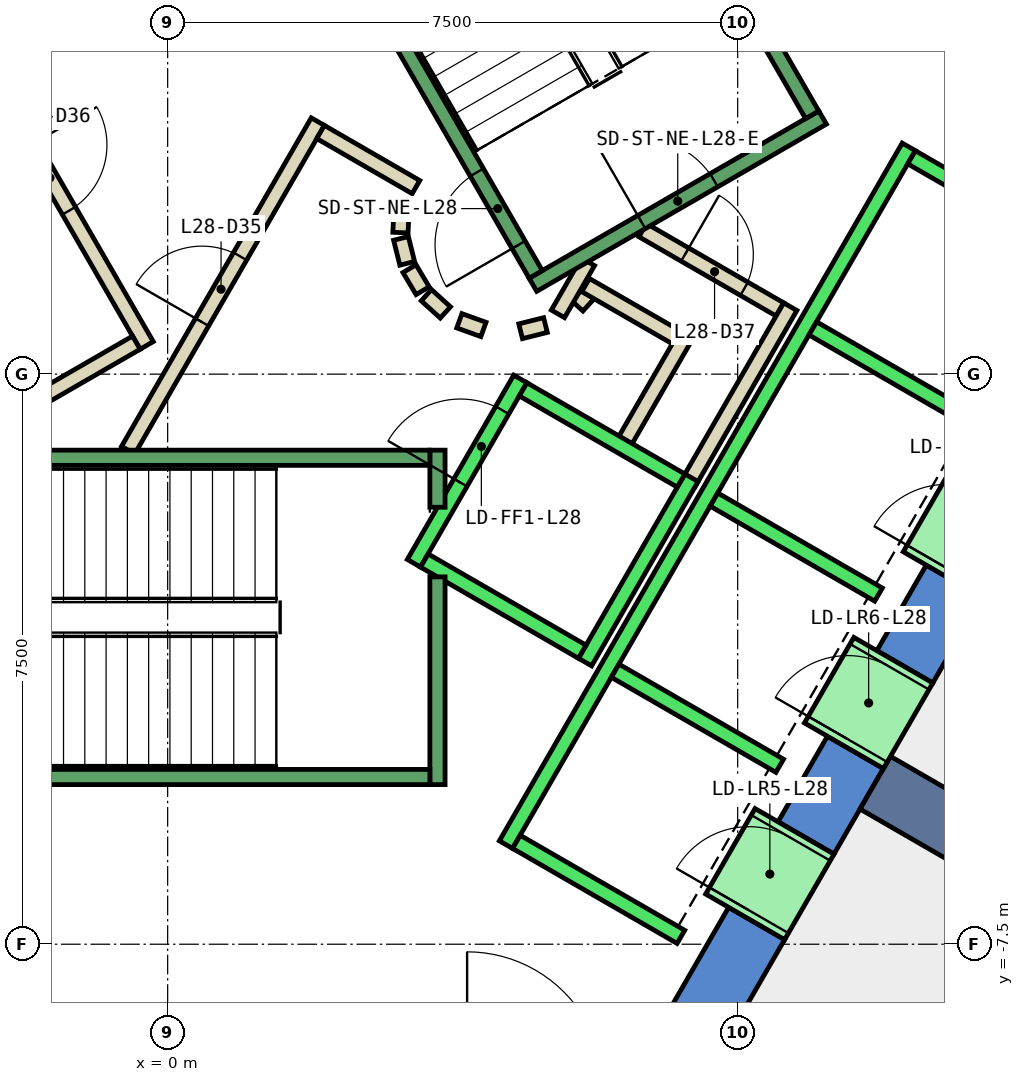
"""IFC4 building model, lengths in metres.
Left out: names, types, materials, properties, quantities, classifications, styles, units other than length and angle.
Written with IfcOpenShell. Run it as: python <this file> out.ifc"""

import sys

from ifc_helpers import new_model, si_unit, direction, frame, frame_2d, origin, place, context, subcontext, project, spatial, polyline, rectangle, outline, extrude, element, fill, save


model = new_model("IFC4")
c1 = context("Model", 3, precision=1e-05, world=origin(), true_north=direction((0.0, 1.0)))
c2 = subcontext(c1, "Body", "Model", "MODEL_VIEW")
j1 = project(units=[si_unit("LENGTHUNIT", "METRE"), si_unit("PLANEANGLEUNIT", "RADIAN")], contexts=[c1])
p1 = place(None, origin())
s1 = spatial("IfcSite", under=j1, at=p1, CompositionType="ELEMENT")
p2 = place(p1, origin())
s2 = spatial("IfcBuilding", under=s1, at=p2, CompositionType="ELEMENT")
p3 = place(p2, frame((0.0, 0.0, 128.6)))
s3 = spatial("IfcBuildingStorey", under=s2, at=p3, CompositionType="ELEMENT", Elevation=128.6)
p4 = place(p3, frame((0.0, 0.0, -0.4)))
e1 = element("IfcWall", 1, at=p4, inside=s3, PredefinedType="SHEAR", context=c2, shape_type="SweptSolid", body=[
    extrude(outline(polyline([(8.517, 11.748), (7.781, 11.323), (12.875, 2.5), (13.856, 2.5), (8.517, 11.748)])), origin(), (0.0, 0.0, 1.0), 4.0),
])
p5 = place(p3, frame((0.0, 0.0, -0.4)))
e2 = element("IfcWall", 2, at=p5, inside=s3, PredefinedType="SHEAR", context=c2, shape_type="SweptSolid", body=[
    extrude(outline(polyline([(8.117, -7.44), (7.381, -7.015), (6.437, -8.65), (6.928, -9.5), (8.117, -7.44)])), origin(), (0.0, 0.0, 1.0), 4.0),
])
p6 = place(p3, frame((0.0, 0.0, -0.4)))
e3 = element("IfcWall", 3, at=p6, inside=s3, PredefinedType="SHEAR", context=c2, shape_type="SweptSolid", body=[
    extrude(outline(polyline([(9.417, -5.189), (8.681, -4.764), (8.031, -5.889), (8.767, -6.314), (9.417, -5.189)])), origin(), (0.0, 0.0, 1.0), 4.0),
])
p7 = place(p3, frame((0.0, 0.0, -0.4)))
e4 = element("IfcWall", 4, at=p7, inside=s3, PredefinedType="SHEAR", context=c2, shape_type="SweptSolid", body=[
    extrude(outline(polyline([(10.717, -2.937), (9.981, -2.512), (9.331, -3.638), (10.067, -4.063), (10.717, -2.937)])), origin(), (0.0, 0.0, 1.0), 4.0),
])
p8 = place(p3, frame((9.31, -5.375, -0.4), z_axis=(0.0, 0.0, 1.0), x_axis=(0.866017533419, -0.500013631625, 0.0)))
e5 = element("IfcWall", 5, at=p8, inside=s3, PredefinedType="SHEAR", context=c2, shape_type="SweptSolid", body=[
    extrude(rectangle(XDim=9.0, YDim=0.8, at=frame_2d((4.5, 0.0))), origin(), (0.0, 0.0, 1.0), 4.0),
])
p9 = place(p3, frame((5.39, 0.898, 0.0), z_axis=(0.0, 0.0, 1.0), x_axis=(0.673828488714, 0.738887791073, 0.0)))
e6 = element("IfcWall", 6, at=p9, inside=s3, PredefinedType="PARTITIONING", context=c2, shape_type="SweptSolid", body=[
    extrude(rectangle(XDim=0.263, YDim=0.2, at=frame_2d((0.131, 0.0))), origin(), (0.0, 0.0, 1.0), 3.6),
])
p10 = place(p3, frame((5.499, 1.172, 0.0), z_axis=(0.0, 0.0, 1.0), x_axis=(0.866333505267, -0.499465972466, 0.0)))
e7 = element("IfcWall", 7, at=p10, inside=s3, PredefinedType="PARTITIONING", context=c2, shape_type="SweptSolid", body=[
    extrude(rectangle(XDim=1.374, YDim=0.2, at=frame_2d((0.687, 0.0))), origin(), (0.0, 0.0, 1.0), 3.6),
])
p11 = place(p3, frame((6.826, 0.522, 0.0), z_axis=(0.0, 0.0, 1.0), x_axis=(-0.500016722714, -0.866015748706, 0.0)))
e8 = element("IfcWall", 8, at=p11, inside=s3, PredefinedType="PARTITIONING", context=c2, shape_type="SweptSolid", body=[
    extrude(rectangle(XDim=1.7, YDim=0.2, at=frame_2d((0.85, 0.0))), origin(), (0.0, 0.0, 1.0), 3.6),
])
p12 = place(p3, frame((6.25, 1.894, 0.0), z_axis=(0.0, 0.0, 1.0), x_axis=(0.866043184279, -0.499969202016, 0.0)))
e9 = element("IfcWall", 9, at=p12, inside=s3, PredefinedType="PARTITIONING", context=c2, shape_type="SweptSolid", body=[
    extrude(rectangle(XDim=2.084, YDim=0.2, at=frame_2d((1.042, 0.0))), origin(), (0.0, 0.0, 1.0), 3.6),
])
p13 = place(p12, frame((0.642, 0.0, 0.0)))
e10 = element("IfcOpeningElement", 10, at=p13, cuts=e9, PredefinedType="OPENING", context=c2, shape_type="SweptSolid", body=[
    extrude(rectangle(XDim=0.9, YDim=2.1, at=frame_2d((0.45, 1.05))), frame((0.0, 0.11, 0.0), z_axis=(0.0, -1.0, 0.0), x_axis=(1.0, 0.0, 0.0)), (0.0, 0.0, 1.0), 0.22),
])
p14 = place(p3, frame((8.192, 0.888, 0.0), z_axis=(0.0, 0.0, 1.0), x_axis=(-0.499940625693, -0.866059680843, 0.0)))
e11 = element("IfcWall", 11, at=p14, inside=s3, PredefinedType="PARTITIONING", context=c2, shape_type="SweptSolid", body=[
    extrude(rectangle(XDim=2.68, YDim=0.2, at=frame_2d((1.34, 0.0))), origin(), (0.0, 0.0, 1.0), 3.6),
])
p15 = place(p3, frame((5.135, 0.793, 0.0), z_axis=(0.0, 0.0, 1.0), x_axis=(0.499526442893, 0.866298639529, 0.0)))
e12 = element("IfcWall", 12, at=p15, inside=s3, PredefinedType="PARTITIONING", context=c2, shape_type="SweptSolid", body=[
    extrude(rectangle(XDim=0.791, YDim=0.2, at=frame_2d((0.396, 0.0))), origin(), (0.0, 0.0, 1.0), 3.6),
])
p16 = place(p3, frame((-0.52, -1.0, 0.0), z_axis=(0.0, 0.0, 1.0), x_axis=(0.50011622646, 0.865958290007, 0.0)))
e13 = element("IfcWall", 13, at=p16, inside=s3, PredefinedType="PARTITIONING", context=c2, shape_type="SweptSolid", body=[
    extrude(rectangle(XDim=4.991, YDim=0.2, at=frame_2d((2.496, 0.0))), origin(), (0.0, 0.0, 1.0), 3.6),
])
p17 = place(p16, frame((1.945, 0.0, 0.0)))
e14 = element("IfcOpeningElement", 14, at=p17, cuts=e13, PredefinedType="OPENING", context=c2, shape_type="SweptSolid", body=[
    extrude(rectangle(XDim=1.0, YDim=2.1, at=frame_2d((0.5, 1.05))), frame((0.0, 0.11, 0.0), z_axis=(0.0, -1.0, 0.0), x_axis=(1.0, 0.0, 0.0)), (0.0, 0.0, 1.0), 0.22),
])
p18 = place(p3, frame((2.012, 3.186, 0.0), z_axis=(0.0, 0.0, 1.0), x_axis=(0.865891012941, -0.500232699559, 0.0)))
e15 = element("IfcWall", 15, at=p18, inside=s3, PredefinedType="PARTITIONING", context=c2, shape_type="SweptSolid", body=[
    extrude(rectangle(XDim=1.449, YDim=0.2, at=frame_2d((0.725, 0.0))), origin(), (0.0, 0.0, 1.0), 3.6),
])
p19 = place(p3, frame((3.079, 2.199, 0.0), z_axis=(0.0, 0.0, 1.0), x_axis=(-0.047771483479, -0.998858290933, 0.0)))
e16 = element("IfcWall", 16, at=p19, inside=s3, PredefinedType="PARTITIONING", context=c2, shape_type="SweptSolid", body=[
    extrude(rectangle(XDim=0.337, YDim=0.2, at=frame_2d((0.169, 0.0))), origin(), (0.0, 0.0, 1.0), 3.6),
])
p20 = place(p3, frame((3.07, 1.786, 0.0), z_axis=(0.0, 0.0, 1.0), x_axis=(0.242705583207, -0.970099994784, 0.0)))
e17 = element("IfcWall", 17, at=p20, inside=s3, PredefinedType="PARTITIONING", context=c2, shape_type="SweptSolid", body=[
    extrude(rectangle(XDim=0.338, YDim=0.2, at=frame_2d((0.169, 0.0))), origin(), (0.0, 0.0, 1.0), 3.6),
])
for number, where, z_axis, x_axis in (
    (18, (3.182, 1.388, 0.0), (0.0, 0.0, 1.0), (0.512, -0.859, 0.0)),
    (19, (3.404, 1.039, 0.0), (0.0, 0.0, 1.0), (0.74, -0.672, 0.0)),
):
    element("IfcWall", number, at=place(p3, frame(where, z_axis=z_axis, x_axis=x_axis)), inside=s3, PredefinedType="PARTITIONING", context=c2, shape_type="SweptSolid", body=[
        extrude(rectangle(XDim=0.338, YDim=0.2, at=frame_2d((0.169, 0.0))), origin(), (0.0, 0.0, 1.0), 3.6),
    ])
p21 = place(p3, frame((3.838, 0.702, 0.0), z_axis=(0.0, 0.0, 1.0), x_axis=(0.941035081519, -0.338308993895, 0.0)))
e20 = element("IfcWall", 20, at=p21, inside=s3, PredefinedType="PARTITIONING", context=c2, shape_type="SweptSolid", body=[
    extrude(rectangle(XDim=0.337, YDim=0.2, at=frame_2d((0.168, 0.0))), origin(), (0.0, 0.0, 1.0), 3.6),
])
p22 = place(p3, frame((4.644, 0.564, 0.0), z_axis=(0.0, 0.0, 1.0), x_axis=(0.969929076366, 0.243387729394, 0.0)))
e21 = element("IfcWall", 21, at=p22, inside=s3, PredefinedType="PARTITIONING", context=c2, shape_type="SweptSolid", body=[
    extrude(rectangle(XDim=0.337, YDim=0.2, at=frame_2d((0.168, 0.0))), origin(), (0.0, 0.0, 1.0), 3.6),
])
p23 = place(p3, frame((-2.771, 4.7, 0.0), z_axis=(0.0, 0.0, 1.0), x_axis=(0.499969479948, -0.866043023828, 0.0)))
e22 = element("IfcWall", 22, at=p23, inside=s3, PredefinedType="PARTITIONING", context=c2, shape_type="SweptSolid", body=[
    extrude(rectangle(XDim=4.99, YDim=0.2, at=frame_2d((2.495, 0.0))), origin(), (0.0, 0.0, 1.0), 3.6),
])
p24 = place(p23, frame((1.945, 0.0, 0.0)))
e23 = element("IfcOpeningElement", 23, at=p24, cuts=e22, PredefinedType="OPENING", context=c2, shape_type="SweptSolid", body=[
    extrude(rectangle(XDim=1.0, YDim=2.1, at=frame_2d((0.5, 1.05))), frame((0.0, 0.11, 0.0), z_axis=(0.0, -1.0, 0.0), x_axis=(1.0, 0.0, 0.0)), (0.0, 0.0, 1.0), 0.22),
])
p25 = place(p3, frame((-0.412, 0.414, 0.0), z_axis=(0.0, 0.0, 1.0), x_axis=(-0.866017369001, -0.500013916395, 0.0)))
e24 = element("IfcWall", 24, at=p25, inside=s3, PredefinedType="PARTITIONING", context=c2, shape_type="SweptSolid", body=[
    extrude(rectangle(XDim=1.45, YDim=0.2, at=frame_2d((0.725, 0.0))), origin(), (0.0, 0.0, 1.0), 3.6),
])
p26 = place(p3, frame((12.401, -7.621, 0.0), z_axis=(0.0, 0.0, 1.0), x_axis=(-0.499983724212, -0.866034800411, 0.0)))
e25 = element("IfcWall", 25, at=p26, inside=s3, PredefinedType="PARTITIONING", context=c2, shape_type="SweptSolid", body=[
    extrude(rectangle(XDim=9.302, YDim=0.2, at=frame_2d((4.651, 0.0))), origin(), (0.0, 0.0, 1.0), 3.6),
])
p27 = place(p26, frame((0.231, 0.0, 0.0)))
e26 = element("IfcOpeningElement", 26, at=p27, cuts=e25, PredefinedType="OPENING", context=c2, shape_type="SweptSolid", body=[
    extrude(rectangle(XDim=1.0, YDim=2.1, at=frame_2d((0.5, 1.05))), frame((0.0, 0.11, 0.0), z_axis=(0.0, -1.0, 0.0), x_axis=(1.0, 0.0, 0.0)), (0.0, 0.0, 1.0), 0.22),
])
p28 = place(p26, frame((1.331, 0.0, 0.0)))
e27 = element("IfcOpeningElement", 27, at=p28, cuts=e25, PredefinedType="OPENING", context=c2, shape_type="SweptSolid", body=[
    extrude(rectangle(XDim=1.0, YDim=2.1, at=frame_2d((0.5, 1.05))), frame((0.0, 0.11, 0.0), z_axis=(0.0, -1.0, 0.0), x_axis=(1.0, 0.0, 0.0)), (0.0, 0.0, 1.0), 0.22),
])
p29 = place(p3, frame((3.24, -2.488, 0.0), z_axis=(0.0, 0.0, 1.0), x_axis=(0.49994636267, 0.866056369097, 0.0)))
e28 = element("IfcWall", 28, at=p29, inside=s3, PredefinedType="STANDARD", context=c2, shape_type="SweptSolid", body=[
    extrude(rectangle(XDim=2.8, YDim=0.2, at=frame_2d((1.4, 0.0))), origin(), (0.0, 0.0, 1.0), 3.6),
])
p30 = place(p29, frame((1.225, 0.0, 0.0)))
e29 = element("IfcOpeningElement", 29, at=p30, cuts=e28, PredefinedType="OPENING", context=c2, shape_type="SweptSolid", body=[
    extrude(rectangle(XDim=1.1, YDim=2.1, at=frame_2d((0.55, 1.05))), frame((0.0, 0.11, 0.0), z_axis=(0.0, -1.0, 0.0), x_axis=(1.0, 0.0, 0.0)), (0.0, 0.0, 1.0), 0.22),
])
p31 = place(p3, frame((5.492, -3.788, 0.0), z_axis=(0.0, 0.0, 1.0), x_axis=(0.500011755427, 0.866018616679, 0.0)))
e30 = element("IfcWall", 30, at=p31, inside=s3, PredefinedType="STANDARD", context=c2, shape_type="SweptSolid", body=[
    extrude(rectangle(XDim=2.8, YDim=0.2, at=frame_2d((1.4, 0.0))), origin(), (0.0, 0.0, 1.0), 3.6),
])
p32 = place(p3, frame((3.377, -2.452, 0.0), z_axis=(0.0, 0.0, 1.0), x_axis=(0.865955154139, -0.50012165622, 0.0)))
e31 = element("IfcWall", 31, at=p32, inside=s3, PredefinedType="STANDARD", context=c2, shape_type="SweptSolid", body=[
    extrude(rectangle(XDim=2.4, YDim=0.2, at=frame_2d((1.2, 0.0))), origin(), (0.0, 0.0, 1.0), 3.6),
])
p33 = place(p3, frame((4.677, -0.2, 0.0), z_axis=(0.0, 0.0, 1.0), x_axis=(0.865973769406, -0.500089422704, 0.0)))
e32 = element("IfcWall", 32, at=p33, inside=s3, PredefinedType="STANDARD", context=c2, shape_type="SweptSolid", body=[
    extrude(rectangle(XDim=2.399, YDim=0.2, at=frame_2d((1.2, 0.0))), origin(), (0.0, 0.0, 1.0), 3.6),
])
p34 = place(p3, frame((4.451, -6.19, 0.0), z_axis=(0.0, 0.0, 1.0), x_axis=(0.50000090737, 0.866024879913, 0.0)))
e33 = element("IfcWall", 33, at=p34, inside=s3, PredefinedType="STANDARD", context=c2, shape_type="SweptSolid", body=[
    extrude(rectangle(XDim=10.6, YDim=0.2, at=frame_2d((5.3, 0.0))), origin(), (0.0, 0.0, 1.0), 3.6),
])
for number, where, z_axis, x_axis in (
    (34, (4.588, -6.153, 0.0), (0.0, 0.0, 1.0), (0.866, -0.5, 0.0)),
    (35, (5.888, -3.902, 0.0), (0.0, 0.0, 1.0), (0.866, -0.5, 0.0)),
    (36, (7.188, -1.65, 0.0), (0.0, 0.0, 1.0), (0.866, -0.5, 0.0)),
    (37, (8.488, 0.602, 0.0), (0.0, 0.0, 1.0), (0.866, -0.5, 0.0)),
):
    element("IfcWall", number, at=place(p3, frame(where, z_axis=z_axis, x_axis=x_axis)), inside=s3, PredefinedType="STANDARD", context=c2, shape_type="SweptSolid", body=[
        extrude(rectangle(XDim=2.5, YDim=0.2, at=frame_2d((1.25, 0.0))), origin(), (0.0, 0.0, 1.0), 3.6),
    ])
p35 = place(p3, frame((9.788, 2.853, 0.0), z_axis=(0.0, 0.0, 1.0), x_axis=(0.865998541277, -0.500046524342, 0.0)))
e38 = element("IfcWall", 38, at=p35, inside=s3, PredefinedType="STANDARD", context=c2, shape_type="SweptSolid", body=[
    extrude(rectangle(XDim=2.5, YDim=0.2, at=frame_2d((1.25, 0.0))), origin(), (0.0, 0.0, 1.0), 3.6),
])
p36 = place(p3, frame((7.598, -7.14, 0.0), z_axis=(0.0, 0.0, 1.0), x_axis=(0.500362116554, 0.865816234728, 0.0)))
e39 = element("IfcWall", 39, at=p36, inside=s3, PredefinedType="STANDARD", context=c2, shape_type="SweptSolid", body=[
    extrude(rectangle(XDim=1.299, YDim=1.2, at=frame_2d((0.65, 0.0))), origin(), (0.0, 0.0, 1.0), 2.4),
])
p37 = place(p36, frame((0.1, 0.0, 0.0)))
e40 = element("IfcOpeningElement", 40, at=p37, cuts=e39, PredefinedType="OPENING", context=c2, shape_type="SweptSolid", body=[
    extrude(rectangle(XDim=1.1, YDim=2.3, at=frame_2d((0.55, 1.15))), frame((0.0, 0.61, 0.0), z_axis=(0.0, -1.0, 0.0), x_axis=(1.0, 0.0, 0.0)), (0.0, 0.0, 1.0), 1.22),
])
p38 = place(p3, frame((8.898, -4.889, 0.0), z_axis=(0.0, 0.0, 1.0), x_axis=(0.500036693733, 0.866004217611, 0.0)))
e41 = element("IfcWall", 41, at=p38, inside=s3, PredefinedType="STANDARD", context=c2, shape_type="SweptSolid", body=[
    extrude(rectangle(XDim=1.3, YDim=1.2, at=frame_2d((0.65, 0.0))), origin(), (0.0, 0.0, 1.0), 2.4),
])
p39 = place(p38, frame((0.1, 0.0, 0.0)))
e42 = element("IfcOpeningElement", 42, at=p39, cuts=e41, PredefinedType="OPENING", context=c2, shape_type="SweptSolid", body=[
    extrude(rectangle(XDim=1.1, YDim=2.3, at=frame_2d((0.55, 1.15))), frame((0.0, 0.61, 0.0), z_axis=(0.0, -1.0, 0.0), x_axis=(1.0, 0.0, 0.0)), (0.0, 0.0, 1.0), 1.22),
])
p40 = place(p3, frame((10.198, -2.637, 0.0), z_axis=(0.0, 0.0, 1.0), x_axis=(0.49989585183, 0.866085525409, 0.0)))
e43 = element("IfcWall", 43, at=p40, inside=s3, PredefinedType="STANDARD", context=c2, shape_type="SweptSolid", body=[
    extrude(rectangle(XDim=1.3, YDim=1.2, at=frame_2d((0.65, 0.0))), origin(), (0.0, 0.0, 1.0), 2.4),
])
p41 = place(p40, frame((0.1, 0.0, 0.0)))
e44 = element("IfcOpeningElement", 44, at=p41, cuts=e43, PredefinedType="OPENING", context=c2, shape_type="SweptSolid", body=[
    extrude(rectangle(XDim=1.1, YDim=2.3, at=frame_2d((0.55, 1.15))), frame((0.0, 0.61, 0.0), z_axis=(0.0, -1.0, 0.0), x_axis=(1.0, 0.0, 0.0)), (0.0, 0.0, 1.0), 1.22),
])
p42 = place(p3, frame((3.55, -2.667, 0.0), z_axis=(0.0, 0.0, 1.0), x_axis=(0.0, -1.0, 0.0)))
e45 = element("IfcWall", 45, at=p42, inside=s3, PredefinedType="STANDARD", context=c2, shape_type="SweptSolid", body=[
    extrude(rectangle(XDim=2.733, YDim=0.2, at=frame_2d((1.366, 0.0))), origin(), (0.0, 0.0, 1.0), 3.6),
])
p43 = place(p3, frame((3.55, -1.0, 0.0), z_axis=(0.0, 0.0, 1.0), x_axis=(0.0, -1.0, 0.0)))
e46 = element("IfcWall", 46, at=p43, inside=s3, PredefinedType="STANDARD", context=c2, shape_type="SweptSolid", body=[
    extrude(rectangle(XDim=0.751, YDim=0.2, at=frame_2d((0.375, 0.0))), origin(), (0.0, 0.0, 1.0), 3.6),
])
p44 = place(p3, frame((-3.45, -1.1, 0.0), z_axis=(0.0, 0.0, 1.0), x_axis=(1.0, 0.0, 0.0)))
e47 = element("IfcWall", 47, at=p44, inside=s3, PredefinedType="STANDARD", context=c2, shape_type="SweptSolid", body=[
    extrude(rectangle(XDim=6.9, YDim=0.2, at=frame_2d((3.45, 0.0))), origin(), (0.0, 0.0, 1.0), 3.6),
])
p45 = place(p44, frame((0.45, 0.0, 0.0)))
e48 = element("IfcOpeningElement", 48, at=p45, cuts=e47, PredefinedType="OPENING", context=c2, shape_type="SweptSolid", body=[
    extrude(rectangle(XDim=1.1, YDim=2.2, at=frame_2d((0.55, 1.1))), frame((0.0, 0.11, 0.0), z_axis=(0.0, -1.0, 0.0), x_axis=(1.0, 0.0, 0.0)), (0.0, 0.0, 1.0), 0.22),
])
p46 = place(p3, frame((-3.45, -5.3, 0.0), z_axis=(0.0, 0.0, 1.0), x_axis=(1.0, 0.0, 0.0)))
e49 = element("IfcWall", 49, at=p46, inside=s3, PredefinedType="STANDARD", context=c2, shape_type="SweptSolid", body=[
    extrude(rectangle(XDim=6.9, YDim=0.2, at=frame_2d((3.45, 0.0))), origin(), (0.0, 0.0, 1.0), 3.6),
])
p47 = place(p3, frame((4.806, 1.176, 0.0), z_axis=(0.0, 0.0, 1.0), x_axis=(0.866059941101, 0.499940174841, 0.0)))
e50 = element("IfcWall", 50, at=p47, inside=s3, PredefinedType="STANDARD", context=c2, shape_type="SweptSolid", body=[
    extrude(rectangle(XDim=4.4, YDim=0.2, at=frame_2d((2.2, 0.0))), origin(), (0.0, 0.0, 1.0), 3.6),
])
p48 = place(p47, frame((1.65, 0.0, 0.0)))
e51 = element("IfcOpeningElement", 51, at=p48, cuts=e50, PredefinedType="OPENING", context=c2, shape_type="SweptSolid", body=[
    extrude(rectangle(XDim=1.1, YDim=2.2, at=frame_2d((0.55, 1.1))), frame((0.0, 0.11, 0.0), z_axis=(0.0, -1.0, 0.0), x_axis=(1.0, 0.0, 0.0)), (0.0, 0.0, 1.0), 0.22),
])
p49 = place(p3, frame((4.843, 1.312, 0.0), z_axis=(0.0, 0.0, 1.0), x_axis=(-0.499963383562, 0.866046543262, 0.0)))
e52 = element("IfcWall", 52, at=p49, inside=s3, PredefinedType="STANDARD", context=c2, shape_type="SweptSolid", body=[
    extrude(rectangle(XDim=6.9, YDim=0.2, at=frame_2d((3.45, 0.0))), origin(), (0.0, 0.0, 1.0), 3.6),
])
p50 = place(p49, frame((0.45, 0.0, 0.0)))
e53 = element("IfcOpeningElement", 53, at=p50, cuts=e52, PredefinedType="OPENING", context=c2, shape_type="SweptSolid", body=[
    extrude(rectangle(XDim=1.1, YDim=2.2, at=frame_2d((0.55, 1.1))), frame((0.0, 0.11, 0.0), z_axis=(0.0, -1.0, 0.0), x_axis=(1.0, 0.0, 0.0)), (0.0, 0.0, 1.0), 0.22),
])
p51 = place(p3, frame((8.48, 3.412, 0.0), z_axis=(0.0, 0.0, 1.0), x_axis=(-0.499978703459, 0.866037698999, 0.0)))
e54 = element("IfcWall", 54, at=p51, inside=s3, PredefinedType="STANDARD", context=c2, shape_type="SweptSolid", body=[
    extrude(rectangle(XDim=6.9, YDim=0.2, at=frame_2d((3.45, 0.0))), origin(), (0.0, 0.0, 1.0), 3.6),
])
p52 = place(p3, frame((-1.393, 7.288, 0.0), z_axis=(0.0, 0.0, 1.0), x_axis=(-0.499963383562, -0.866046543262, 0.0)))
e55 = element("IfcWall", 55, at=p52, inside=s3, PredefinedType="STANDARD", context=c2, shape_type="SweptSolid", body=[
    extrude(rectangle(XDim=6.9, YDim=0.2, at=frame_2d((3.45, 0.0))), origin(), (0.0, 0.0, 1.0), 3.6),
])
p53 = place(p52, frame((0.45, 0.0, 0.0)))
e56 = element("IfcOpeningElement", 56, at=p53, cuts=e55, PredefinedType="OPENING", context=c2, shape_type="SweptSolid", body=[
    extrude(rectangle(XDim=1.1, YDim=2.2, at=frame_2d((0.55, 1.1))), frame((0.0, 0.11, 0.0), z_axis=(0.0, -1.0, 0.0), x_axis=(1.0, 0.0, 0.0)), (0.0, 0.0, 1.0), 0.22),
])
p54 = place(p17, origin())
e57 = element("IfcDoor", 57, at=p54, inside=s3, OperationType="SINGLE_SWING_LEFT", PredefinedType="DOOR", context=c2, shape_type="SweptSolid", body=[
    extrude(rectangle(XDim=1.0, YDim=2.1, at=frame_2d((0.5, 1.05))), frame((0.0, 0.025, 0.0), z_axis=(0.0, -1.0, 0.0), x_axis=(1.0, 0.0, 0.0)), (0.0, 0.0, 1.0), 0.05),
])
fill(e14, e57)
p55 = place(p24, origin())
e58 = element("IfcDoor", 58, at=p55, inside=s3, OperationType="SINGLE_SWING_RIGHT", PredefinedType="DOOR", context=c2, shape_type="SweptSolid", body=[
    extrude(rectangle(XDim=1.0, YDim=2.1, at=frame_2d((0.5, 1.05))), frame((0.0, 0.025, 0.0), z_axis=(0.0, -1.0, 0.0), x_axis=(1.0, 0.0, 0.0)), (0.0, 0.0, 1.0), 0.05),
])
fill(e23, e58)
p56 = place(p13, origin())
e59 = element("IfcDoor", 59, at=p56, inside=s3, OperationType="SINGLE_SWING_LEFT", PredefinedType="DOOR", context=c2, shape_type="SweptSolid", body=[
    extrude(rectangle(XDim=0.9, YDim=2.1, at=frame_2d((0.45, 1.05))), frame((0.0, 0.025, 0.0), z_axis=(0.0, -1.0, 0.0), x_axis=(1.0, 0.0, 0.0)), (0.0, 0.0, 1.0), 0.05),
])
fill(e10, e59)
p57 = place(p37, origin())
e60 = element("IfcDoor", 60, at=p57, inside=s3, OperationType="SLIDING_TO_LEFT", PredefinedType="DOOR", context=c2, shape_type="SweptSolid", body=[
    extrude(rectangle(XDim=1.1, YDim=2.3, at=frame_2d((0.55, 1.15))), frame((0.0, 0.025, 0.0), z_axis=(0.0, -1.0, 0.0), x_axis=(1.0, 0.0, 0.0)), (0.0, 0.0, 1.0), 0.05),
])
fill(e40, e60)
p58 = place(p39, origin())
e61 = element("IfcDoor", 61, at=p58, inside=s3, OperationType="SLIDING_TO_LEFT", PredefinedType="DOOR", context=c2, shape_type="SweptSolid", body=[
    extrude(rectangle(XDim=1.1, YDim=2.3, at=frame_2d((0.55, 1.15))), frame((0.0, 0.025, 0.0), z_axis=(0.0, -1.0, 0.0), x_axis=(1.0, 0.0, 0.0)), (0.0, 0.0, 1.0), 0.05),
])
fill(e42, e61)
p59 = place(p30, origin())
e62 = element("IfcDoor", 62, at=p59, inside=s3, OperationType="SLIDING_TO_LEFT", PredefinedType="DOOR", context=c2, shape_type="SweptSolid", body=[
    extrude(rectangle(XDim=1.1, YDim=2.1, at=frame_2d((0.55, 1.05))), frame((0.0, 0.025, 0.0), z_axis=(0.0, -1.0, 0.0), x_axis=(1.0, 0.0, 0.0)), (0.0, 0.0, 1.0), 0.05),
])
fill(e29, e62)
p60 = place(p50, origin())
e63 = element("IfcDoor", 63, at=p60, inside=s3, OperationType="SINGLE_SWING_LEFT", PredefinedType="DOOR", context=c2, shape_type="SweptSolid", body=[
    extrude(rectangle(XDim=1.1, YDim=2.2, at=frame_2d((0.55, 1.1))), frame((0.0, 0.025, 0.0), z_axis=(0.0, -1.0, 0.0), x_axis=(1.0, 0.0, 0.0)), (0.0, 0.0, 1.0), 0.05),
])
fill(e53, e63)
p61 = place(p48, origin())
e64 = element("IfcDoor", 64, at=p61, inside=s3, OperationType="SINGLE_SWING_LEFT", PredefinedType="DOOR", context=c2, shape_type="SweptSolid", body=[
    extrude(rectangle(XDim=1.1, YDim=2.2, at=frame_2d((0.55, 1.1))), frame((0.0, 0.025, 0.0), z_axis=(0.0, -1.0, 0.0), x_axis=(1.0, 0.0, 0.0)), (0.0, 0.0, 1.0), 0.05),
])
fill(e51, e64)
save(model, sys.argv[1])
